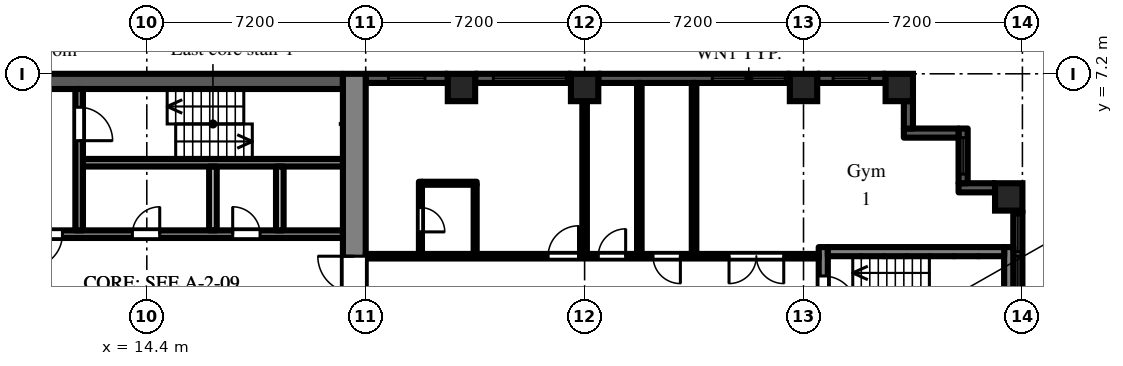
"""IFC4 building model, lengths in metres.
Left out: names, types, materials, properties, quantities, classifications, styles, units other than length and angle.
Written with IfcOpenShell. Run it as: python <this file> out.ifc"""

import sys

from ifc_helpers import new_model, si_unit, direction, frame, frame_2d, origin, origin_2d, place, context, subcontext, project, spatial, rectangle, extrude, element, fill, save


model = new_model("IFC4")
c1 = context("Model", 3, precision=1e-05, world=origin(), true_north=direction((0.0, 1.0)))
c2 = subcontext(c1, "Body", "Model", "MODEL_VIEW")
j1 = project(units=[si_unit("LENGTHUNIT", "METRE"), si_unit("PLANEANGLEUNIT", "RADIAN")], contexts=[c1])
p1 = place(None, origin())
s1 = spatial("IfcSite", under=j1, at=p1, CompositionType="ELEMENT")
p2 = place(p1, origin())
s2 = spatial("IfcBuilding", under=s1, at=p2, CompositionType="ELEMENT")
p3 = place(p2, frame((0.0, 0.0, 53.7)))
s3 = spatial("IfcBuildingStorey", under=s2, at=p3, CompositionType="ELEMENT", Elevation=53.7)
for number, where, z_axis, x_axis in (
    (1, (24.75, 6.75, 0.0), (0.0, 0.0, 1.0), (1.0, 0.0, 0.0)),
    (2, (28.8, 6.75, 0.0), (0.0, 0.0, 1.0), (1.0, 0.0, 0.0)),
    (3, (36.0, 6.75, 0.0), (0.0, 0.0, 1.0), (1.0, 0.0, 0.0)),
    (4, (39.15, 6.75, 0.0), (0.0, 0.0, 1.0), (1.0, 0.0, 0.0)),
    (5, (42.75, 3.15, 0.0), (0.0, 0.0, 1.0), (1.0, 0.0, 0.0)),
):
    element("IfcColumn", number, at=place(p3, frame(where, z_axis=z_axis, x_axis=x_axis)), inside=s3, PredefinedType="COLUMN", context=c2, shape_type="SweptSolid", body=[
        extrude(rectangle(XDim=0.9, YDim=0.9, at=origin_2d()), origin(), (0.0, 0.0, 1.0), 3.0),
    ])
p4 = place(p3, frame((43.05, -2.7, 0.0), z_axis=(0.0, 0.0, 1.0), x_axis=(0.0, 1.0, 0.0)))
e6 = element("IfcWall", 6, at=p4, inside=s3, PredefinedType="SOLIDWALL", context=c2, shape_type="SweptSolid", body=[
    extrude(rectangle(XDim=5.4, YDim=0.3, at=frame_2d((2.7, 0.0))), origin(), (0.0, 0.0, 1.0), 2.1),
])
p5 = place(p4, frame((1.5, 0.0, 0.2)))
e7 = element("IfcOpeningElement", 7, at=p5, cuts=e6, PredefinedType="OPENING", context=c2, shape_type="SweptSolid", body=[
    extrude(rectangle(XDim=2.4, YDim=1.85, at=frame_2d((1.2, 0.925))), frame((0.0, 0.16, 0.0), z_axis=(0.0, -1.0, 0.0), x_axis=(1.0, 0.0, 0.0)), (0.0, 0.0, 1.0), 0.32),
])
p6 = place(p4, frame((4.05, 0.0, 0.2)))
e8 = element("IfcOpeningElement", 8, at=p6, cuts=e6, PredefinedType="OPENING", context=c2, shape_type="SweptSolid", body=[
    extrude(rectangle(XDim=1.2, YDim=1.85, at=frame_2d((0.6, 0.925))), frame((0.0, 0.16, 0.0), z_axis=(0.0, -1.0, 0.0), x_axis=(1.0, 0.0, 0.0)), (0.0, 0.0, 1.0), 0.32),
])
p7 = place(p3, frame((42.3, 3.45, 0.0), z_axis=(0.0, 0.0, 1.0), x_axis=(-1.0, 0.0, 0.0)))
e9 = element("IfcWall", 9, at=p7, inside=s3, PredefinedType="SOLIDWALL", context=c2, shape_type="SweptSolid", body=[
    extrude(rectangle(XDim=1.2, YDim=0.3, at=frame_2d((0.6, 0.0))), origin(), (0.0, 0.0, 1.0), 2.575),
])
p8 = place(p3, frame((41.25, 3.6, 0.0), z_axis=(0.0, 0.0, 1.0), x_axis=(0.0, 1.0, 0.0)))
e10 = element("IfcWall", 10, at=p8, inside=s3, PredefinedType="SOLIDWALL", context=c2, shape_type="SweptSolid", body=[
    extrude(rectangle(XDim=1.8, YDim=0.3, at=frame_2d((0.9, 0.0))), origin(), (0.0, 0.0, 1.0), 2.575),
])
p9 = place(p8, frame((0.3, 0.0, 0.2)))
e11 = element("IfcOpeningElement", 11, at=p9, cuts=e10, PredefinedType="OPENING", context=c2, shape_type="SweptSolid", body=[
    extrude(rectangle(XDim=1.2, YDim=1.85, at=frame_2d((0.6, 0.925))), frame((0.0, 0.16, 0.0), z_axis=(0.0, -1.0, 0.0), x_axis=(1.0, 0.0, 0.0)), (0.0, 0.0, 1.0), 0.32),
])
p10 = place(p3, frame((41.1, 5.25, 0.0), z_axis=(0.0, 0.0, 1.0), x_axis=(-1.0, 0.0, 0.0)))
e12 = element("IfcWall", 12, at=p10, inside=s3, PredefinedType="SOLIDWALL", context=c2, shape_type="SweptSolid", body=[
    extrude(rectangle(XDim=1.8, YDim=0.3, at=frame_2d((0.9, 0.0))), origin(), (0.0, 0.0, 1.0), 2.575),
])
p11 = place(p3, frame((39.45, 5.4, 0.0), z_axis=(0.0, 0.0, 1.0), x_axis=(0.0, 1.0, 0.0)))
e13 = element("IfcWall", 13, at=p11, inside=s3, PredefinedType="SOLIDWALL", context=c2, shape_type="SweptSolid", body=[
    extrude(rectangle(XDim=0.9, YDim=0.3, at=frame_2d((0.45, 0.0))), origin(), (0.0, 0.0, 1.0), 2.575),
])
p12 = place(p3, frame((38.7, 7.05, 0.0), z_axis=(0.0, 0.0, 1.0), x_axis=(-1.0, 0.0, 0.0)))
e14 = element("IfcWall", 14, at=p12, inside=s3, PredefinedType="SOLIDWALL", context=c2, shape_type="SweptSolid", body=[
    extrude(rectangle(XDim=2.25, YDim=0.3, at=frame_2d((1.125, 0.0))), origin(), (0.0, 0.0, 1.0), 2.1),
])
p13 = place(p12, frame((0.525, 0.0, 0.2)))
e15 = element("IfcOpeningElement", 15, at=p13, cuts=e14, PredefinedType="OPENING", context=c2, shape_type="SweptSolid", body=[
    extrude(rectangle(XDim=1.2, YDim=1.85, at=frame_2d((0.6, 0.925))), frame((0.0, 0.16, 0.0), z_axis=(0.0, -1.0, 0.0), x_axis=(1.0, 0.0, 0.0)), (0.0, 0.0, 1.0), 0.32),
])
p14 = place(p3, frame((35.55, 7.05, 0.0), z_axis=(0.0, 0.0, 1.0), x_axis=(-1.0, 0.0, 0.0)))
e16 = element("IfcWall", 16, at=p14, inside=s3, PredefinedType="SOLIDWALL", context=c2, shape_type="SweptSolid", body=[
    extrude(rectangle(XDim=6.3, YDim=0.3, at=frame_2d((3.15, 0.0))), origin(), (0.0, 0.0, 1.0), 2.1),
])
p15 = place(p14, frame((0.15, 0.0, 0.2)))
e17 = element("IfcOpeningElement", 17, at=p15, cuts=e16, PredefinedType="OPENING", context=c2, shape_type="SweptSolid", body=[
    extrude(rectangle(XDim=2.4, YDim=1.85, at=frame_2d((1.2, 0.925))), frame((0.0, 0.16, 0.0), z_axis=(0.0, -1.0, 0.0), x_axis=(1.0, 0.0, 0.0)), (0.0, 0.0, 1.0), 0.32),
])
p16 = place(p3, frame((28.35, 7.05, 0.0), z_axis=(0.0, 0.0, 1.0), x_axis=(-1.0, 0.0, 0.0)))
e18 = element("IfcWall", 18, at=p16, inside=s3, PredefinedType="SOLIDWALL", context=c2, shape_type="SweptSolid", body=[
    extrude(rectangle(XDim=3.15, YDim=0.3, at=frame_2d((1.575, 0.0))), origin(), (0.0, 0.0, 1.0), 2.1),
])
p17 = place(p16, frame((0.15, 0.0, 0.2)))
e19 = element("IfcOpeningElement", 19, at=p17, cuts=e18, PredefinedType="OPENING", context=c2, shape_type="SweptSolid", body=[
    extrude(rectangle(XDim=2.4, YDim=1.85, at=frame_2d((1.2, 0.925))), frame((0.0, 0.16, 0.0), z_axis=(0.0, -1.0, 0.0), x_axis=(1.0, 0.0, 0.0)), (0.0, 0.0, 1.0), 0.32),
])
p18 = place(p3, frame((24.3, 7.05, 0.0), z_axis=(0.0, 0.0, 1.0), x_axis=(-1.0, 0.0, 0.0)))
e20 = element("IfcWall", 20, at=p18, inside=s3, PredefinedType="SOLIDWALL", context=c2, shape_type="SweptSolid", body=[
    extrude(rectangle(XDim=2.7, YDim=0.3, at=frame_2d((1.35, 0.0))), origin(), (0.0, 0.0, 1.0), 2.1),
])
p19 = place(p18, frame((0.75, 0.0, 0.2)))
e21 = element("IfcOpeningElement", 21, at=p19, cuts=e20, PredefinedType="OPENING", context=c2, shape_type="SweptSolid", body=[
    extrude(rectangle(XDim=1.2, YDim=1.85, at=frame_2d((0.6, 0.925))), frame((0.0, 0.16, 0.0), z_axis=(0.0, -1.0, 0.0), x_axis=(1.0, 0.0, 0.0)), (0.0, 0.0, 1.0), 0.32),
])
p20 = place(p3, frame((21.225, -7.2, 0.0), z_axis=(0.0, 0.0, 1.0), x_axis=(0.0, 1.0, 0.0)))
e22 = element("IfcWall", 22, at=p20, inside=s3, PredefinedType="SHEAR", context=c2, shape_type="SweptSolid", body=[
    extrude(rectangle(XDim=14.4, YDim=0.75, at=frame_2d((7.2, 0.0))), origin(), (0.0, 0.0, 1.0), 2.575),
])
p21 = place(p20, frame((6.0, 0.0, 0.0)))
e23 = element("IfcOpeningElement", 23, at=p21, cuts=e22, PredefinedType="OPENING", context=c2, shape_type="SweptSolid", body=[
    extrude(rectangle(XDim=2.4, YDim=2.2, at=frame_2d((1.2, 1.1))), frame((0.0, 0.385, 0.0), z_axis=(0.0, -1.0, 0.0), x_axis=(1.0, 0.0, 0.0)), (0.0, 0.0, 1.0), 0.77),
])
p22 = place(p3, frame((7.9, 6.95, 0.0), z_axis=(0.0, 0.0, 1.0), x_axis=(1.0, 0.0, 0.0)))
e24 = element("IfcWall", 24, at=p22, inside=s3, PredefinedType="SHEAR", context=c2, shape_type="SweptSolid", body=[
    extrude(rectangle(XDim=12.95, YDim=0.5, at=frame_2d((6.475, 0.0))), origin(), (0.0, 0.0, 1.0), 2.575),
])
p23 = place(p3, frame((7.9, 1.925, 0.0), z_axis=(0.0, 0.0, 1.0), x_axis=(1.0, 0.0, 0.0)))
e25 = element("IfcWall", 25, at=p23, inside=s3, PredefinedType="SHEAR", context=c2, shape_type="SweptSolid", body=[
    extrude(rectangle(XDim=12.95, YDim=0.25, at=frame_2d((6.475, 0.0))), origin(), (0.0, 0.0, 1.0), 2.575),
])
p24 = place(p23, frame((0.525, 0.0, 0.0)))
e26 = element("IfcOpeningElement", 26, at=p24, cuts=e25, PredefinedType="OPENING", context=c2, shape_type="SweptSolid", body=[
    extrude(rectangle(XDim=0.9, YDim=2.1, at=frame_2d((0.45, 1.05))), frame((0.0, 0.135, 0.0), z_axis=(0.0, -1.0, 0.0), x_axis=(1.0, 0.0, 0.0)), (0.0, 0.0, 1.0), 0.27),
])
p25 = place(p23, frame((2.625, 0.0, 0.0)))
e27 = element("IfcOpeningElement", 27, at=p25, cuts=e25, PredefinedType="OPENING", context=c2, shape_type="SweptSolid", body=[
    extrude(rectangle(XDim=1.1, YDim=2.1, at=frame_2d((0.55, 1.05))), frame((0.0, 0.135, 0.0), z_axis=(0.0, -1.0, 0.0), x_axis=(1.0, 0.0, 0.0)), (0.0, 0.0, 1.0), 0.27),
])
p26 = place(p23, frame((6.025, 0.0, 0.0)))
e28 = element("IfcOpeningElement", 28, at=p26, cuts=e25, PredefinedType="OPENING", context=c2, shape_type="SweptSolid", body=[
    extrude(rectangle(XDim=0.9, YDim=2.1, at=frame_2d((0.45, 1.05))), frame((0.0, 0.135, 0.0), z_axis=(0.0, -1.0, 0.0), x_axis=(1.0, 0.0, 0.0)), (0.0, 0.0, 1.0), 0.27),
])
p27 = place(p23, frame((9.325, 0.0, 0.0)))
e29 = element("IfcOpeningElement", 29, at=p27, cuts=e25, PredefinedType="OPENING", context=c2, shape_type="SweptSolid", body=[
    extrude(rectangle(XDim=0.9, YDim=2.1, at=frame_2d((0.45, 1.05))), frame((0.0, 0.135, 0.0), z_axis=(0.0, -1.0, 0.0), x_axis=(1.0, 0.0, 0.0)), (0.0, 0.0, 1.0), 0.27),
])
p28 = place(p3, frame((12.3, 4.275, 0.0), z_axis=(0.0, 0.0, 1.0), x_axis=(1.0, 0.0, 0.0)))
e30 = element("IfcWall", 30, at=p28, inside=s3, PredefinedType="SHEAR", context=c2, shape_type="SweptSolid", body=[
    extrude(rectangle(XDim=8.55, YDim=0.25, at=frame_2d((4.275, 0.0))), origin(), (0.0, 0.0, 1.0), 2.575),
])
p29 = place(p3, frame((12.175, 2.05, 0.0), z_axis=(0.0, 0.0, 1.0), x_axis=(0.0, 1.0, 0.0)))
e31 = element("IfcWall", 31, at=p29, inside=s3, PredefinedType="SHEAR", context=c2, shape_type="SweptSolid", body=[
    extrude(rectangle(XDim=4.65, YDim=0.25, at=frame_2d((2.325, 0.0))), origin(), (0.0, 0.0, 1.0), 2.575),
])
p30 = place(p29, frame((2.95, 0.0, 0.0)))
e32 = element("IfcOpeningElement", 32, at=p30, cuts=e31, PredefinedType="OPENING", context=c2, shape_type="SweptSolid", body=[
    extrude(rectangle(XDim=1.1, YDim=2.1, at=frame_2d((0.55, 1.05))), frame((0.0, 0.135, 0.0), z_axis=(0.0, -1.0, 0.0), x_axis=(1.0, 0.0, 0.0)), (0.0, 0.0, 1.0), 0.27),
])
for number, where, z_axis, x_axis in (
    (33, (16.575, 2.05, 0.0), (0.0, 0.0, 1.0), (0.0, 1.0, 0.0)),
    (34, (18.775, 2.05, 0.0), (0.0, 0.0, 1.0), (0.0, 1.0, 0.0)),
):
    element("IfcWall", number, at=place(p3, frame(where, z_axis=z_axis, x_axis=x_axis)), inside=s3, PredefinedType="PARTITIONING", context=c2, shape_type="SweptSolid", body=[
        extrude(rectangle(XDim=2.1, YDim=0.25, at=frame_2d((1.05, 0.0))), origin(), (0.0, 0.0, 1.0), 2.575),
    ])
p31 = place(p3, frame((36.65, -1.5, 0.0), z_axis=(0.0, 0.0, 1.0), x_axis=(0.0, 1.0, 0.0)))
e35 = element("IfcWall", 35, at=p31, inside=s3, PredefinedType="SHEAR", context=c2, shape_type="SweptSolid", body=[
    extrude(rectangle(XDim=3.0, YDim=0.3, at=frame_2d((1.5, 0.0))), origin(), (0.0, 0.0, 1.0), 2.575),
])
p32 = place(p31, frame((0.95, 0.0, 0.0)))
e36 = element("IfcOpeningElement", 36, at=p32, cuts=e35, PredefinedType="OPENING", context=c2, shape_type="SweptSolid", body=[
    extrude(rectangle(XDim=1.1, YDim=2.1, at=frame_2d((0.55, 1.05))), frame((0.0, 0.16, 0.0), z_axis=(0.0, -1.0, 0.0), x_axis=(1.0, 0.0, 0.0)), (0.0, 0.0, 1.0), 0.32),
])
p33 = place(p3, frame((42.75, -1.5, 0.0), z_axis=(0.0, 0.0, 1.0), x_axis=(0.0, 1.0, 0.0)))
e37 = element("IfcWall", 37, at=p33, inside=s3, PredefinedType="SHEAR", context=c2, shape_type="SweptSolid", body=[
    extrude(rectangle(XDim=3.0, YDim=0.3, at=frame_2d((1.5, 0.0))), origin(), (0.0, 0.0, 1.0), 2.575),
])
p34 = place(p3, frame((36.8, 1.35, 0.0), z_axis=(0.0, 0.0, 1.0), x_axis=(1.0, 0.0, 0.0)))
e38 = element("IfcWall", 38, at=p34, inside=s3, PredefinedType="SHEAR", context=c2, shape_type="SweptSolid", body=[
    extrude(rectangle(XDim=5.8, YDim=0.3, at=frame_2d((2.9, 0.0))), origin(), (0.0, 0.0, 1.0), 2.575),
])
p35 = place(p3, frame((21.6, 1.2, 0.0), z_axis=(0.0, 0.0, 1.0), x_axis=(1.0, 0.0, 0.0)))
e39 = element("IfcWall", 39, at=p35, inside=s3, PredefinedType="PARTITIONING", context=c2, shape_type="SweptSolid", body=[
    extrude(rectangle(XDim=14.9, YDim=0.15, at=frame_2d((7.45, 0.0))), origin(), (0.0, 0.0, 1.0), 2.575),
])
p36 = place(p35, frame((6.0, 0.0, 0.0)))
e40 = element("IfcOpeningElement", 40, at=p36, cuts=e39, PredefinedType="OPENING", context=c2, shape_type="SweptSolid", body=[
    extrude(rectangle(XDim=1.0, YDim=2.1, at=frame_2d((0.5, 1.05))), frame((0.0, 0.085, 0.0), z_axis=(0.0, -1.0, 0.0), x_axis=(1.0, 0.0, 0.0)), (0.0, 0.0, 1.0), 0.17),
])
p37 = place(p35, frame((7.65, 0.0, 0.0)))
e41 = element("IfcOpeningElement", 41, at=p37, cuts=e39, PredefinedType="OPENING", context=c2, shape_type="SweptSolid", body=[
    extrude(rectangle(XDim=0.9, YDim=2.1, at=frame_2d((0.45, 1.05))), frame((0.0, 0.085, 0.0), z_axis=(0.0, -1.0, 0.0), x_axis=(1.0, 0.0, 0.0)), (0.0, 0.0, 1.0), 0.17),
])
p38 = place(p35, frame((9.45, 0.0, 0.0)))
e42 = element("IfcOpeningElement", 42, at=p38, cuts=e39, PredefinedType="OPENING", context=c2, shape_type="SweptSolid", body=[
    extrude(rectangle(XDim=0.9, YDim=2.1, at=frame_2d((0.45, 1.05))), frame((0.0, 0.085, 0.0), z_axis=(0.0, -1.0, 0.0), x_axis=(1.0, 0.0, 0.0)), (0.0, 0.0, 1.0), 0.17),
])
p39 = place(p35, frame((11.95, 0.0, 0.0)))
e43 = element("IfcOpeningElement", 43, at=p39, cuts=e39, PredefinedType="OPENING", context=c2, shape_type="SweptSolid", body=[
    extrude(rectangle(XDim=1.8, YDim=2.1, at=frame_2d((0.9, 1.05))), frame((0.0, 0.085, 0.0), z_axis=(0.0, -1.0, 0.0), x_axis=(1.0, 0.0, 0.0)), (0.0, 0.0, 1.0), 0.17),
])
p40 = place(p3, frame((23.4, 1.275, 0.0), z_axis=(0.0, 0.0, 1.0), x_axis=(0.0, 1.0, 0.0)))
e44 = element("IfcWall", 44, at=p40, inside=s3, PredefinedType="PARTITIONING", context=c2, shape_type="SweptSolid", body=[
    extrude(rectangle(XDim=2.375, YDim=0.1, at=frame_2d((1.188, 0.0))), origin(), (0.0, 0.0, 1.0), 2.575),
])
p41 = place(p40, frame((0.725, 0.0, 0.0)))
e45 = element("IfcOpeningElement", 45, at=p41, cuts=e44, PredefinedType="OPENING", context=c2, shape_type="SweptSolid", body=[
    extrude(rectangle(XDim=0.8, YDim=2.1, at=frame_2d((0.4, 1.05))), frame((0.0, 0.06, 0.0), z_axis=(0.0, -1.0, 0.0), x_axis=(1.0, 0.0, 0.0)), (0.0, 0.0, 1.0), 0.12),
])
p42 = place(p3, frame((23.45, 3.6, 0.0), z_axis=(0.0, 0.0, 1.0), x_axis=(1.0, 0.0, 0.0)))
e46 = element("IfcWall", 46, at=p42, inside=s3, PredefinedType="PARTITIONING", context=c2, shape_type="SweptSolid", body=[
    extrude(rectangle(XDim=1.8, YDim=0.1, at=frame_2d((0.9, 0.0))), origin(), (0.0, 0.0, 1.0), 2.575),
])
p43 = place(p3, frame((25.2, 1.275, 0.0), z_axis=(0.0, 0.0, 1.0), x_axis=(0.0, 1.0, 0.0)))
e47 = element("IfcWall", 47, at=p43, inside=s3, PredefinedType="PARTITIONING", context=c2, shape_type="SweptSolid", body=[
    extrude(rectangle(XDim=2.275, YDim=0.1, at=frame_2d((1.138, 0.0))), origin(), (0.0, 0.0, 1.0), 2.575),
])
for number, where, z_axis, x_axis in (
    (48, (28.8, 1.275, 0.0), (0.0, 0.0, 1.0), (0.0, 1.0, 0.0)),
    (49, (30.6, 1.275, 0.0), (0.0, 0.0, 1.0), (0.0, 1.0, 0.0)),
    (50, (32.4, 1.275, 0.0), (0.0, 0.0, 1.0), (0.0, 1.0, 0.0)),
):
    element("IfcWall", number, at=place(p3, frame(where, z_axis=z_axis, x_axis=x_axis)), inside=s3, PredefinedType="PARTITIONING", context=c2, shape_type="SweptSolid", body=[
        extrude(rectangle(XDim=5.625, YDim=0.15, at=frame_2d((2.812, 0.0))), origin(), (0.0, 0.0, 1.0), 2.575),
    ])
p44 = place(p5, origin())
e51 = element("IfcWindow", 51, at=p44, inside=s3, PartitioningType="SINGLE_PANEL", PredefinedType="WINDOW", context=c2, shape_type="SweptSolid", body=[
    extrude(rectangle(XDim=2.4, YDim=1.85, at=frame_2d((1.2, 0.925))), frame((0.0, 0.03, 0.0), z_axis=(0.0, -1.0, 0.0), x_axis=(1.0, 0.0, 0.0)), (0.0, 0.0, 1.0), 0.06),
])
fill(e7, e51)
p45 = place(p6, origin())
e52 = element("IfcWindow", 52, at=p45, inside=s3, PartitioningType="SINGLE_PANEL", PredefinedType="WINDOW", context=c2, shape_type="SweptSolid", body=[
    extrude(rectangle(XDim=1.2, YDim=1.85, at=frame_2d((0.6, 0.925))), frame((0.0, 0.03, 0.0), z_axis=(0.0, -1.0, 0.0), x_axis=(1.0, 0.0, 0.0)), (0.0, 0.0, 1.0), 0.06),
])
fill(e8, e52)
p46 = place(p9, origin())
e53 = element("IfcWindow", 53, at=p46, inside=s3, PartitioningType="SINGLE_PANEL", PredefinedType="WINDOW", context=c2, shape_type="SweptSolid", body=[
    extrude(rectangle(XDim=1.2, YDim=1.85, at=frame_2d((0.6, 0.925))), frame((0.0, 0.03, 0.0), z_axis=(0.0, -1.0, 0.0), x_axis=(1.0, 0.0, 0.0)), (0.0, 0.0, 1.0), 0.06),
])
fill(e11, e53)
p47 = place(p13, origin())
e54 = element("IfcWindow", 54, at=p47, inside=s3, PartitioningType="SINGLE_PANEL", PredefinedType="WINDOW", context=c2, shape_type="SweptSolid", body=[
    extrude(rectangle(XDim=1.2, YDim=1.85, at=frame_2d((0.6, 0.925))), frame((0.0, 0.03, 0.0), z_axis=(0.0, -1.0, 0.0), x_axis=(1.0, 0.0, 0.0)), (0.0, 0.0, 1.0), 0.06),
])
fill(e15, e54)
p48 = place(p15, origin())
e55 = element("IfcWindow", 55, at=p48, inside=s3, PartitioningType="SINGLE_PANEL", PredefinedType="WINDOW", context=c2, shape_type="SweptSolid", body=[
    extrude(rectangle(XDim=2.4, YDim=1.85, at=frame_2d((1.2, 0.925))), frame((0.0, 0.03, 0.0), z_axis=(0.0, -1.0, 0.0), x_axis=(1.0, 0.0, 0.0)), (0.0, 0.0, 1.0), 0.06),
])
fill(e17, e55)
p49 = place(p17, origin())
e56 = element("IfcWindow", 56, at=p49, inside=s3, PartitioningType="SINGLE_PANEL", PredefinedType="WINDOW", context=c2, shape_type="SweptSolid", body=[
    extrude(rectangle(XDim=2.4, YDim=1.85, at=frame_2d((1.2, 0.925))), frame((0.0, 0.03, 0.0), z_axis=(0.0, -1.0, 0.0), x_axis=(1.0, 0.0, 0.0)), (0.0, 0.0, 1.0), 0.06),
])
fill(e19, e56)
p50 = place(p19, origin())
e57 = element("IfcWindow", 57, at=p50, inside=s3, PartitioningType="SINGLE_PANEL", PredefinedType="WINDOW", context=c2, shape_type="SweptSolid", body=[
    extrude(rectangle(XDim=1.2, YDim=1.85, at=frame_2d((0.6, 0.925))), frame((0.0, 0.03, 0.0), z_axis=(0.0, -1.0, 0.0), x_axis=(1.0, 0.0, 0.0)), (0.0, 0.0, 1.0), 0.06),
])
fill(e21, e57)
p51 = place(p30, frame((1.1, 0.0, 0.0), z_axis=(0.0, 0.0, 1.0), x_axis=(-1.0, 0.0, 0.0)))
e58 = element("IfcDoor", 58, at=p51, inside=s3, OperationType="SINGLE_SWING_RIGHT", PredefinedType="DOOR", context=c2, shape_type="SweptSolid", body=[
    extrude(rectangle(XDim=1.1, YDim=2.1, at=frame_2d((0.55, 1.05))), frame((0.0, 0.025, 0.0), z_axis=(0.0, -1.0, 0.0), x_axis=(1.0, 0.0, 0.0)), (0.0, 0.0, 1.0), 0.05),
])
fill(e32, e58)
p52 = place(p25, frame((1.1, 0.0, 0.0), z_axis=(0.0, 0.0, 1.0), x_axis=(-1.0, 0.0, 0.0)))
e59 = element("IfcDoor", 59, at=p52, inside=s3, OperationType="SINGLE_SWING_RIGHT", PredefinedType="DOOR", context=c2, shape_type="SweptSolid", body=[
    extrude(rectangle(XDim=1.1, YDim=2.1, at=frame_2d((0.55, 1.05))), frame((0.0, 0.025, 0.0), z_axis=(0.0, -1.0, 0.0), x_axis=(1.0, 0.0, 0.0)), (0.0, 0.0, 1.0), 0.05),
])
fill(e27, e59)
p53 = place(p21, origin())
e60 = element("IfcDoor", 60, at=p53, inside=s3, OperationType="DOUBLE_DOOR_DOUBLE_SWING", PredefinedType="DOOR", context=c2, shape_type="SweptSolid", body=[
    extrude(rectangle(XDim=2.4, YDim=2.2, at=frame_2d((1.2, 1.1))), frame((0.0, 0.025, 0.0), z_axis=(0.0, -1.0, 0.0), x_axis=(1.0, 0.0, 0.0)), (0.0, 0.0, 1.0), 0.05),
])
fill(e23, e60)
p54 = place(p26, origin())
e61 = element("IfcDoor", 61, at=p54, inside=s3, OperationType="SINGLE_SWING_RIGHT", PredefinedType="DOOR", context=c2, shape_type="SweptSolid", body=[
    extrude(rectangle(XDim=0.9, YDim=2.1, at=frame_2d((0.45, 1.05))), frame((0.0, 0.025, 0.0), z_axis=(0.0, -1.0, 0.0), x_axis=(1.0, 0.0, 0.0)), (0.0, 0.0, 1.0), 0.05),
])
fill(e28, e61)
p55 = place(p27, origin())
e62 = element("IfcDoor", 62, at=p55, inside=s3, OperationType="SINGLE_SWING_LEFT", PredefinedType="DOOR", context=c2, shape_type="SweptSolid", body=[
    extrude(rectangle(XDim=0.9, YDim=2.1, at=frame_2d((0.45, 1.05))), frame((0.0, 0.025, 0.0), z_axis=(0.0, -1.0, 0.0), x_axis=(1.0, 0.0, 0.0)), (0.0, 0.0, 1.0), 0.05),
])
fill(e29, e62)
p56 = place(p32, frame((1.1, 0.0, 0.0), z_axis=(0.0, 0.0, 1.0), x_axis=(-1.0, 0.0, 0.0)))
e63 = element("IfcDoor", 63, at=p56, inside=s3, OperationType="SINGLE_SWING_RIGHT", PredefinedType="DOOR", context=c2, shape_type="SweptSolid", body=[
    extrude(rectangle(XDim=1.1, YDim=2.1, at=frame_2d((0.55, 1.05))), frame((0.0, 0.025, 0.0), z_axis=(0.0, -1.0, 0.0), x_axis=(1.0, 0.0, 0.0)), (0.0, 0.0, 1.0), 0.05),
])
fill(e36, e63)
p57 = place(p41, frame((0.8, 0.0, 0.0), z_axis=(0.0, 0.0, 1.0), x_axis=(-1.0, 0.0, 0.0)))
e64 = element("IfcDoor", 64, at=p57, inside=s3, OperationType="SINGLE_SWING_RIGHT", PredefinedType="DOOR", context=c2, shape_type="SweptSolid", body=[
    extrude(rectangle(XDim=0.8, YDim=2.1, at=frame_2d((0.4, 1.05))), frame((0.0, 0.025, 0.0), z_axis=(0.0, -1.0, 0.0), x_axis=(1.0, 0.0, 0.0)), (0.0, 0.0, 1.0), 0.05),
])
fill(e45, e64)
p58 = place(p36, origin())
e65 = element("IfcDoor", 65, at=p58, inside=s3, OperationType="SINGLE_SWING_RIGHT", PredefinedType="DOOR", context=c2, shape_type="SweptSolid", body=[
    extrude(rectangle(XDim=1.0, YDim=2.1, at=frame_2d((0.5, 1.05))), frame((0.0, 0.025, 0.0), z_axis=(0.0, -1.0, 0.0), x_axis=(1.0, 0.0, 0.0)), (0.0, 0.0, 1.0), 0.05),
])
fill(e40, e65)
p59 = place(p37, origin())
e66 = element("IfcDoor", 66, at=p59, inside=s3, OperationType="SINGLE_SWING_RIGHT", PredefinedType="DOOR", context=c2, shape_type="SweptSolid", body=[
    extrude(rectangle(XDim=0.9, YDim=2.1, at=frame_2d((0.45, 1.05))), frame((0.0, 0.025, 0.0), z_axis=(0.0, -1.0, 0.0), x_axis=(1.0, 0.0, 0.0)), (0.0, 0.0, 1.0), 0.05),
])
fill(e41, e66)
p60 = place(p38, frame((0.9, 0.0, 0.0), z_axis=(0.0, 0.0, 1.0), x_axis=(-1.0, 0.0, 0.0)))
e67 = element("IfcDoor", 67, at=p60, inside=s3, OperationType="SINGLE_SWING_LEFT", PredefinedType="DOOR", context=c2, shape_type="SweptSolid", body=[
    extrude(rectangle(XDim=0.9, YDim=2.1, at=frame_2d((0.45, 1.05))), frame((0.0, 0.025, 0.0), z_axis=(0.0, -1.0, 0.0), x_axis=(1.0, 0.0, 0.0)), (0.0, 0.0, 1.0), 0.05),
])
fill(e42, e67)
p61 = place(p39, frame((1.8, 0.0, 0.0), z_axis=(0.0, 0.0, 1.0), x_axis=(-1.0, 0.0, 0.0)))
e68 = element("IfcDoor", 68, at=p61, inside=s3, OperationType="DOUBLE_DOOR_DOUBLE_SWING", PredefinedType="DOOR", context=c2, shape_type="SweptSolid", body=[
    extrude(rectangle(XDim=1.8, YDim=2.1, at=frame_2d((0.9, 1.05))), frame((0.0, 0.025, 0.0), z_axis=(0.0, -1.0, 0.0), x_axis=(1.0, 0.0, 0.0)), (0.0, 0.0, 1.0), 0.05),
])
fill(e43, e68)
save(model, sys.argv[1])
